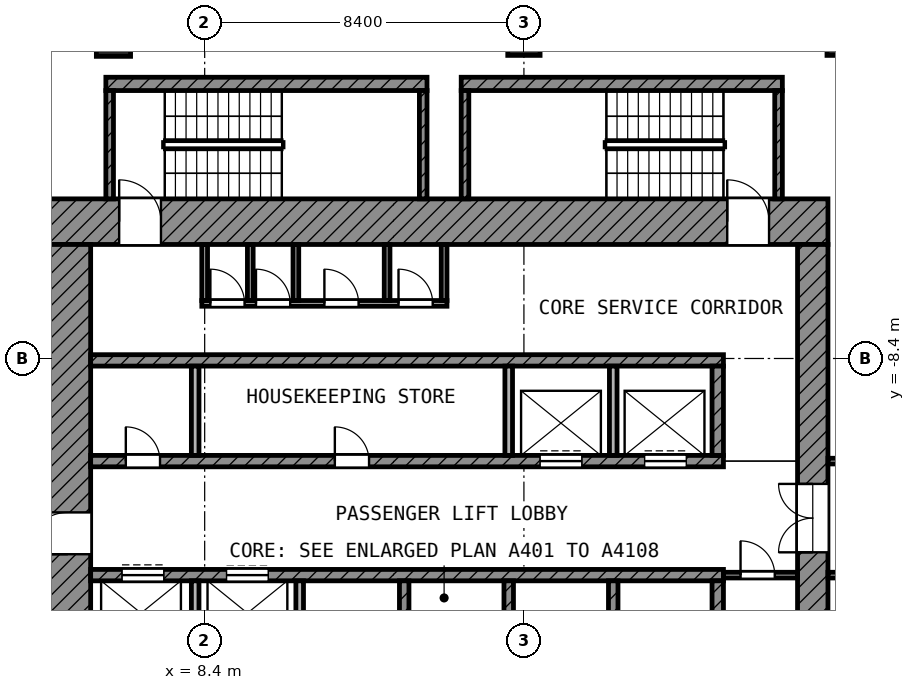
"""IFC4 building model, lengths in metres.
Left out: names, types, materials, properties, quantities, classifications, styles, units other than length and angle.
Written with IfcOpenShell. Run it as: python <this file> out.ifc"""

import sys

from ifc_helpers import new_model, si_unit, direction, frame, frame_2d, origin, origin_2d, place, context, subcontext, project, spatial, rectangle, extrude, element, fill, save


model = new_model("IFC4")
c1 = context("Model", 3, precision=1e-05, world=origin(), true_north=direction((0.0, 1.0)))
c2 = subcontext(c1, "Body", "Model", "MODEL_VIEW")
j1 = project(units=[si_unit("LENGTHUNIT", "METRE"), si_unit("PLANEANGLEUNIT", "RADIAN")], contexts=[c1])
p1 = place(None, origin())
s1 = spatial("IfcSite", under=j1, at=p1, CompositionType="ELEMENT")
p2 = place(p1, origin())
s2 = spatial("IfcBuilding", under=s1, at=p2, CompositionType="ELEMENT")
p3 = place(p2, frame((0.0, 0.0, 226.4)))
s3 = spatial("IfcBuildingStorey", under=s2, at=p3, CompositionType="ELEMENT", Elevation=226.4)
p4 = place(p3, frame((6.0, 0.0, 0.0), z_axis=(0.0, 0.0, 1.0), x_axis=(1.0, 0.0, 0.0)))
e1 = element("IfcColumn", 1, at=p4, inside=s3, PredefinedType="COLUMN", context=c2, shape_type="SweptSolid", body=[
    extrude(rectangle(XDim=0.9, YDim=0.9, at=origin_2d()), origin(), (0.0, 0.0, 1.0), 4.2),
])
for number, where, z_axis, x_axis in (
    (2, (16.8, 0.0, 0.0), (0.0, 0.0, 1.0), (1.0, 0.0, 0.0)),
    (3, (25.2, 0.0, 0.0), (0.0, 0.0, 1.0), (1.0, 0.0, 0.0)),
):
    element("IfcColumn", number, at=place(p3, frame(where, z_axis=z_axis, x_axis=x_axis)), inside=s3, PredefinedType="COLUMN", context=c2, shape_type="SweptSolid", body=[
        extrude(rectangle(XDim=0.85, YDim=0.85, at=origin_2d()), origin(), (0.0, 0.0, 1.0), 4.2),
    ])
p5 = place(p3, frame((4.2, -4.8, 0.0), z_axis=(0.0, 0.0, 1.0), x_axis=(1.0, 0.0, 0.0)))
e4 = element("IfcWall", 4, at=p5, inside=s3, PredefinedType="SHEAR", context=c2, shape_type="SweptSolid", body=[
    extrude(rectangle(XDim=20.6, YDim=1.2, at=frame_2d((10.3, 0.0))), origin(), (0.0, 0.0, 1.0), 3.6),
])
p6 = place(p5, frame((1.95, 0.0, 0.0)))
e5 = element("IfcOpeningElement", 5, at=p6, cuts=e4, PredefinedType="OPENING", context=c2, shape_type="SweptSolid", body=[
    extrude(rectangle(XDim=1.1, YDim=2.1, at=frame_2d((0.55, 1.05))), frame((0.0, 0.61, 0.0), z_axis=(0.0, -1.0, 0.0), x_axis=(1.0, 0.0, 0.0)), (0.0, 0.0, 1.0), 1.22),
])
p7 = place(p5, frame((17.95, 0.0, 0.0)))
e6 = element("IfcOpeningElement", 6, at=p7, cuts=e4, PredefinedType="OPENING", context=c2, shape_type="SweptSolid", body=[
    extrude(rectangle(XDim=1.1, YDim=2.1, at=frame_2d((0.55, 1.05))), frame((0.0, 0.61, 0.0), z_axis=(0.0, -1.0, 0.0), x_axis=(1.0, 0.0, 0.0)), (0.0, 0.0, 1.0), 1.22),
])
p8 = place(p3, frame((4.8, -24.8, 0.0), z_axis=(0.0, 0.0, 1.0), x_axis=(0.0, 1.0, 0.0)))
e7 = element("IfcWall", 7, at=p8, inside=s3, PredefinedType="SHEAR", context=c2, shape_type="SweptSolid", body=[
    extrude(rectangle(XDim=19.4, YDim=1.2, at=frame_2d((9.7, 0.0))), origin(), (0.0, 0.0, 1.0), 3.6),
])
p9 = place(p8, frame((11.25, 0.0, 0.0)))
e8 = element("IfcOpeningElement", 8, at=p9, cuts=e7, PredefinedType="OPENING", context=c2, shape_type="SweptSolid", body=[
    extrude(rectangle(XDim=1.1, YDim=2.1, at=frame_2d((0.55, 1.05))), frame((0.0, 0.61, 0.0), z_axis=(0.0, -1.0, 0.0), x_axis=(1.0, 0.0, 0.0)), (0.0, 0.0, 1.0), 1.22),
])
p10 = place(p8, frame((1.95, 0.0, 0.0)))
e9 = element("IfcOpeningElement", 9, at=p10, cuts=e7, PredefinedType="OPENING", context=c2, shape_type="SweptSolid", body=[
    extrude(rectangle(XDim=1.1, YDim=2.1, at=frame_2d((0.55, 1.05))), frame((0.0, 0.61, 0.0), z_axis=(0.0, -1.0, 0.0), x_axis=(1.0, 0.0, 0.0)), (0.0, 0.0, 1.0), 1.22),
])
p11 = place(p3, frame((24.4, -24.0, 0.0), z_axis=(0.0, 0.0, 1.0), x_axis=(0.0, 1.0, 0.0)))
e10 = element("IfcWall", 10, at=p11, inside=s3, PredefinedType="SHEAR", context=c2, shape_type="SweptSolid", body=[
    extrude(rectangle(XDim=18.6, YDim=0.8, at=frame_2d((9.3, 0.0))), origin(), (0.0, 0.0, 1.0), 3.6),
])
p12 = place(p11, frame((10.5, 0.0, 0.0)))
e11 = element("IfcOpeningElement", 11, at=p12, cuts=e10, PredefinedType="OPENING", context=c2, shape_type="SweptSolid", body=[
    extrude(rectangle(XDim=1.8, YDim=2.1, at=frame_2d((0.9, 1.05))), frame((0.0, 0.41, 0.0), z_axis=(0.0, -1.0, 0.0), x_axis=(1.0, 0.0, 0.0)), (0.0, 0.0, 1.0), 0.82),
])
p13 = place(p3, frame((5.4, -8.45, 0.0), z_axis=(0.0, 0.0, 1.0), x_axis=(1.0, 0.0, 0.0)))
e12 = element("IfcWall", 12, at=p13, inside=s3, PredefinedType="SHEAR", context=c2, shape_type="SweptSolid", body=[
    extrude(rectangle(XDim=16.65, YDim=0.3, at=frame_2d((8.325, 0.0))), origin(), (0.0, 0.0, 1.0), 3.6),
])
p14 = place(p3, frame((5.4, -11.1, 0.0), z_axis=(0.0, 0.0, 1.0), x_axis=(1.0, 0.0, 0.0)))
e13 = element("IfcWall", 13, at=p14, inside=s3, PredefinedType="SHEAR", context=c2, shape_type="SweptSolid", body=[
    extrude(rectangle(XDim=16.65, YDim=0.3, at=frame_2d((8.325, 0.0))), origin(), (0.0, 0.0, 1.0), 3.6),
])
p15 = place(p14, frame((11.825, 0.0, 0.0)))
e14 = element("IfcOpeningElement", 14, at=p15, cuts=e13, PredefinedType="OPENING", context=c2, shape_type="SweptSolid", body=[
    extrude(rectangle(XDim=1.1, YDim=2.1, at=frame_2d((0.55, 1.05))), frame((0.0, 0.16, 0.0), z_axis=(0.0, -1.0, 0.0), x_axis=(1.0, 0.0, 0.0)), (0.0, 0.0, 1.0), 0.32),
])
p16 = place(p14, frame((14.575, 0.0, 0.0)))
e15 = element("IfcOpeningElement", 15, at=p16, cuts=e13, PredefinedType="OPENING", context=c2, shape_type="SweptSolid", body=[
    extrude(rectangle(XDim=1.1, YDim=2.1, at=frame_2d((0.55, 1.05))), frame((0.0, 0.16, 0.0), z_axis=(0.0, -1.0, 0.0), x_axis=(1.0, 0.0, 0.0)), (0.0, 0.0, 1.0), 0.32),
])
p17 = place(p14, frame((0.925, 0.0, 0.0)))
e16 = element("IfcOpeningElement", 16, at=p17, cuts=e13, PredefinedType="OPENING", context=c2, shape_type="SweptSolid", body=[
    extrude(rectangle(XDim=0.9, YDim=2.1, at=frame_2d((0.45, 1.05))), frame((0.0, 0.16, 0.0), z_axis=(0.0, -1.0, 0.0), x_axis=(1.0, 0.0, 0.0)), (0.0, 0.0, 1.0), 0.32),
])
p18 = place(p14, frame((6.425, 0.0, 0.0)))
e17 = element("IfcOpeningElement", 17, at=p18, cuts=e13, PredefinedType="OPENING", context=c2, shape_type="SweptSolid", body=[
    extrude(rectangle(XDim=0.9, YDim=2.1, at=frame_2d((0.45, 1.05))), frame((0.0, 0.16, 0.0), z_axis=(0.0, -1.0, 0.0), x_axis=(1.0, 0.0, 0.0)), (0.0, 0.0, 1.0), 0.32),
])
p19 = place(p3, frame((5.4, -14.1, 0.0), z_axis=(0.0, 0.0, 1.0), x_axis=(1.0, 0.0, 0.0)))
e18 = element("IfcWall", 18, at=p19, inside=s3, PredefinedType="SHEAR", context=c2, shape_type="SweptSolid", body=[
    extrude(rectangle(XDim=16.65, YDim=0.3, at=frame_2d((8.325, 0.0))), origin(), (0.0, 0.0, 1.0), 3.6),
])
p20 = place(p19, frame((0.825, 0.0, 0.0)))
e19 = element("IfcOpeningElement", 19, at=p20, cuts=e18, PredefinedType="OPENING", context=c2, shape_type="SweptSolid", body=[
    extrude(rectangle(XDim=1.1, YDim=2.1, at=frame_2d((0.55, 1.05))), frame((0.0, 0.16, 0.0), z_axis=(0.0, -1.0, 0.0), x_axis=(1.0, 0.0, 0.0)), (0.0, 0.0, 1.0), 0.32),
])
p21 = place(p19, frame((3.575, 0.0, 0.0)))
e20 = element("IfcOpeningElement", 20, at=p21, cuts=e18, PredefinedType="OPENING", context=c2, shape_type="SweptSolid", body=[
    extrude(rectangle(XDim=1.1, YDim=2.1, at=frame_2d((0.55, 1.05))), frame((0.0, 0.16, 0.0), z_axis=(0.0, -1.0, 0.0), x_axis=(1.0, 0.0, 0.0)), (0.0, 0.0, 1.0), 0.32),
])
p22 = place(p3, frame((21.9, -10.95, 0.0), z_axis=(0.0, 0.0, 1.0), x_axis=(0.0, 1.0, 0.0)))
e21 = element("IfcWall", 21, at=p22, inside=s3, PredefinedType="SHEAR", context=c2, shape_type="SweptSolid", body=[
    extrude(rectangle(XDim=2.35, YDim=0.3, at=frame_2d((1.175, 0.0))), origin(), (0.0, 0.0, 1.0), 3.6),
])
p23 = place(p3, frame((21.9, -16.6, 0.0), z_axis=(0.0, 0.0, 1.0), x_axis=(0.0, 1.0, 0.0)))
e22 = element("IfcWall", 22, at=p23, inside=s3, PredefinedType="SHEAR", context=c2, shape_type="SweptSolid", body=[
    extrude(rectangle(XDim=2.35, YDim=0.3, at=frame_2d((1.175, 0.0))), origin(), (0.0, 0.0, 1.0), 3.6),
])
for number, where, z_axis, x_axis in (
    (23, (8.15, -10.95, 0.0), (0.0, 0.0, 1.0), (0.0, 1.0, 0.0)),
    (24, (16.4, -10.95, 0.0), (0.0, 0.0, 1.0), (0.0, 1.0, 0.0)),
    (25, (19.15, -10.95, 0.0), (0.0, 0.0, 1.0), (0.0, 1.0, 0.0)),
):
    element("IfcWall", number, at=place(p3, frame(where, z_axis=z_axis, x_axis=x_axis)), inside=s3, PredefinedType="PARTITIONING", context=c2, shape_type="SweptSolid", body=[
        extrude(rectangle(XDim=2.35, YDim=0.2, at=frame_2d((1.175, 0.0))), origin(), (0.0, 0.0, 1.0), 3.6),
    ])
for number, where, z_axis, x_axis in (
    (26, (8.15, -16.6, 0.0), (0.0, 0.0, 1.0), (0.0, 1.0, 0.0)),
    (27, (10.9, -16.6, 0.0), (0.0, 0.0, 1.0), (0.0, 1.0, 0.0)),
):
    element("IfcWall", number, at=place(p3, frame(where, z_axis=z_axis, x_axis=x_axis)), inside=s3, PredefinedType="PARTITIONING", context=c2, shape_type="SweptSolid", body=[
        extrude(rectangle(XDim=2.35, YDim=0.2, at=frame_2d((1.175, 0.0))), origin(), (0.0, 0.0, 1.0), 3.6),
    ])
for number, where, z_axis, x_axis in (
    (28, (13.65, -16.6, 0.0), (0.0, 0.0, 1.0), (0.0, 1.0, 0.0)),
    (29, (16.4, -16.6, 0.0), (0.0, 0.0, 1.0), (0.0, 1.0, 0.0)),
    (30, (19.15, -16.6, 0.0), (0.0, 0.0, 1.0), (0.0, 1.0, 0.0)),
):
    element("IfcWall", number, at=place(p3, frame(where, z_axis=z_axis, x_axis=x_axis)), inside=s3, PredefinedType="SHEAR", context=c2, shape_type="SweptSolid", body=[
        extrude(rectangle(XDim=2.35, YDim=0.25, at=frame_2d((1.175, 0.0))), origin(), (0.0, 0.0, 1.0), 3.6),
    ])
p24 = place(p3, frame((22.05, -14.1, 0.0), z_axis=(0.0, 0.0, 1.0), x_axis=(1.0, 0.0, 0.0)))
e31 = element("IfcWall", 31, at=p24, inside=s3, PredefinedType="PARTITIONING", context=c2, shape_type="SweptSolid", body=[
    extrude(rectangle(XDim=1.95, YDim=0.15, at=frame_2d((0.975, 0.0))), origin(), (0.0, 0.0, 1.0), 3.6),
])
p25 = place(p24, frame((0.45, 0.0, 0.0)))
e32 = element("IfcOpeningElement", 32, at=p25, cuts=e31, PredefinedType="OPENING", context=c2, shape_type="SweptSolid", body=[
    extrude(rectangle(XDim=0.9, YDim=2.1, at=frame_2d((0.45, 1.05))), frame((0.0, 0.085, 0.0), z_axis=(0.0, -1.0, 0.0), x_axis=(1.0, 0.0, 0.0)), (0.0, 0.0, 1.0), 0.17),
])
p26 = place(p3, frame((8.325, -6.95, 0.0), z_axis=(0.0, 0.0, 1.0), x_axis=(1.0, 0.0, 0.0)))
e33 = element("IfcWall", 33, at=p26, inside=s3, PredefinedType="PARTITIONING", context=c2, shape_type="SweptSolid", body=[
    extrude(rectangle(XDim=6.45, YDim=0.15, at=frame_2d((3.225, 0.0))), origin(), (0.0, 0.0, 1.0), 3.6),
])
p27 = place(p26, frame((0.225, 0.0, 0.0)))
e34 = element("IfcOpeningElement", 34, at=p27, cuts=e33, PredefinedType="OPENING", context=c2, shape_type="SweptSolid", body=[
    extrude(rectangle(XDim=0.9, YDim=2.1, at=frame_2d((0.45, 1.05))), frame((0.0, 0.085, 0.0), z_axis=(0.0, -1.0, 0.0), x_axis=(1.0, 0.0, 0.0)), (0.0, 0.0, 1.0), 0.17),
])
p28 = place(p26, frame((1.425, 0.0, 0.0)))
e35 = element("IfcOpeningElement", 35, at=p28, cuts=e33, PredefinedType="OPENING", context=c2, shape_type="SweptSolid", body=[
    extrude(rectangle(XDim=0.9, YDim=2.1, at=frame_2d((0.45, 1.05))), frame((0.0, 0.085, 0.0), z_axis=(0.0, -1.0, 0.0), x_axis=(1.0, 0.0, 0.0)), (0.0, 0.0, 1.0), 0.17),
])
p29 = place(p26, frame((3.225, 0.0, 0.0)))
e36 = element("IfcOpeningElement", 36, at=p29, cuts=e33, PredefinedType="OPENING", context=c2, shape_type="SweptSolid", body=[
    extrude(rectangle(XDim=0.9, YDim=2.1, at=frame_2d((0.45, 1.05))), frame((0.0, 0.085, 0.0), z_axis=(0.0, -1.0, 0.0), x_axis=(1.0, 0.0, 0.0)), (0.0, 0.0, 1.0), 0.17),
])
p30 = place(p26, frame((5.175, 0.0, 0.0)))
e37 = element("IfcOpeningElement", 37, at=p30, cuts=e33, PredefinedType="OPENING", context=c2, shape_type="SweptSolid", body=[
    extrude(rectangle(XDim=0.9, YDim=2.1, at=frame_2d((0.45, 1.05))), frame((0.0, 0.085, 0.0), z_axis=(0.0, -1.0, 0.0), x_axis=(1.0, 0.0, 0.0)), (0.0, 0.0, 1.0), 0.17),
])
for number, where, z_axis, x_axis in (
    (38, (8.4, -6.875, 0.0), (0.0, 0.0, 1.0), (0.0, 1.0, 0.0)),
    (39, (9.6, -6.875, 0.0), (0.0, 0.0, 1.0), (0.0, 1.0, 0.0)),
    (40, (10.8, -6.875, 0.0), (0.0, 0.0, 1.0), (0.0, 1.0, 0.0)),
    (41, (13.2, -6.875, 0.0), (0.0, 0.0, 1.0), (0.0, 1.0, 0.0)),
    (42, (14.7, -6.875, 0.0), (0.0, 0.0, 1.0), (0.0, 1.0, 0.0)),
):
    element("IfcWall", number, at=place(p3, frame(where, z_axis=z_axis, x_axis=x_axis)), inside=s3, PredefinedType="PARTITIONING", context=c2, shape_type="SweptSolid", body=[
        extrude(rectangle(XDim=1.475, YDim=0.15, at=frame_2d((0.738, 0.0))), origin(), (0.0, 0.0, 1.0), 3.6),
    ])
p31 = place(p3, frame((5.8, -1.175, 0.0), z_axis=(0.0, 0.0, 1.0), x_axis=(1.0, 0.0, 0.0)))
e43 = element("IfcWall", 43, at=p31, inside=s3, PredefinedType="SHEAR", context=c2, shape_type="SweptSolid", body=[
    extrude(rectangle(XDim=8.45, YDim=0.35, at=frame_2d((4.225, 0.0))), origin(), (0.0, 0.0, 1.0), 3.6),
])
for number, where, z_axis, x_axis in (
    (44, (5.9, -4.2, 0.0), (0.0, 0.0, 1.0), (0.0, 1.0, 0.0)),
    (45, (14.15, -4.2, 0.0), (0.0, 0.0, 1.0), (0.0, 1.0, 0.0)),
):
    element("IfcWall", number, at=place(p3, frame(where, z_axis=z_axis, x_axis=x_axis)), inside=s3, PredefinedType="SHEAR", context=c2, shape_type="SweptSolid", body=[
        extrude(rectangle(XDim=2.85, YDim=0.2, at=frame_2d((1.425, 0.0))), origin(), (0.0, 0.0, 1.0), 3.6),
    ])
p32 = place(p3, frame((15.15, -1.175, 0.0), z_axis=(0.0, 0.0, 1.0), x_axis=(1.0, 0.0, 0.0)))
e46 = element("IfcWall", 46, at=p32, inside=s3, PredefinedType="SHEAR", context=c2, shape_type="SweptSolid", body=[
    extrude(rectangle(XDim=8.45, YDim=0.35, at=frame_2d((4.225, 0.0))), origin(), (0.0, 0.0, 1.0), 3.6),
])
for number, where, z_axis, x_axis in (
    (47, (15.25, -4.2, 0.0), (0.0, 0.0, 1.0), (0.0, 1.0, 0.0)),
    (48, (23.5, -4.2, 0.0), (0.0, 0.0, 1.0), (0.0, 1.0, 0.0)),
):
    element("IfcWall", number, at=place(p3, frame(where, z_axis=z_axis, x_axis=x_axis)), inside=s3, PredefinedType="SHEAR", context=c2, shape_type="SweptSolid", body=[
        extrude(rectangle(XDim=2.85, YDim=0.2, at=frame_2d((1.425, 0.0))), origin(), (0.0, 0.0, 1.0), 3.6),
    ])
p33 = place(p3, frame((24.8, -14.1, 0.0), z_axis=(0.0, 0.0, 1.0), x_axis=(1.0, 0.0, 0.0)))
e49 = element("IfcWall", 49, at=p33, inside=s3, PredefinedType="PARTITIONING", context=c2, shape_type="SweptSolid", body=[
    extrude(rectangle(XDim=4.525, YDim=0.15, at=frame_2d((2.262, 0.0))), origin(), (0.0, 0.0, 1.0), 3.6),
])
p34 = place(p33, frame((2.7, 0.0, 0.0)))
e50 = element("IfcOpeningElement", 50, at=p34, cuts=e49, PredefinedType="OPENING", context=c2, shape_type="SweptSolid", body=[
    extrude(rectangle(XDim=1.0, YDim=2.1, at=frame_2d((0.5, 1.05))), frame((0.0, 0.085, 0.0), z_axis=(0.0, -1.0, 0.0), x_axis=(1.0, 0.0, 0.0)), (0.0, 0.0, 1.0), 0.17),
])
p35 = place(p33, frame((1.3, 0.0, 0.0)))
e51 = element("IfcOpeningElement", 51, at=p35, cuts=e49, PredefinedType="OPENING", context=c2, shape_type="SweptSolid", body=[
    extrude(rectangle(XDim=1.0, YDim=2.1, at=frame_2d((0.5, 1.05))), frame((0.0, 0.085, 0.0), z_axis=(0.0, -1.0, 0.0), x_axis=(1.0, 0.0, 0.0)), (0.0, 0.0, 1.0), 0.17),
])
p36 = place(p3, frame((24.8, -11.1, 0.0), z_axis=(0.0, 0.0, 1.0), x_axis=(1.0, 0.0, 0.0)))
e52 = element("IfcWall", 52, at=p36, inside=s3, PredefinedType="PARTITIONING", context=c2, shape_type="SweptSolid", body=[
    extrude(rectangle(XDim=4.6, YDim=0.15, at=frame_2d((2.3, 0.0))), origin(), (0.0, 0.0, 1.0), 3.6),
])
p37 = place(p36, frame((1.9, 0.0, 0.0)))
e53 = element("IfcOpeningElement", 53, at=p37, cuts=e52, PredefinedType="OPENING", context=c2, shape_type="SweptSolid", body=[
    extrude(rectangle(XDim=1.2, YDim=2.1, at=frame_2d((0.6, 1.05))), frame((0.0, 0.085, 0.0), z_axis=(0.0, -1.0, 0.0), x_axis=(1.0, 0.0, 0.0)), (0.0, 0.0, 1.0), 0.17),
])
p38 = place(p15, origin())
e54 = element("IfcDoor", 54, at=p38, inside=s3, OperationType="DOUBLE_DOOR_SLIDING", PredefinedType="DOOR", context=c2, shape_type="SweptSolid", body=[
    extrude(rectangle(XDim=1.1, YDim=2.1, at=frame_2d((0.55, 1.05))), frame((0.0, 0.025, 0.0), z_axis=(0.0, -1.0, 0.0), x_axis=(1.0, 0.0, 0.0)), (0.0, 0.0, 1.0), 0.05),
])
fill(e14, e54)
p39 = place(p16, origin())
e55 = element("IfcDoor", 55, at=p39, inside=s3, OperationType="DOUBLE_DOOR_SLIDING", PredefinedType="DOOR", context=c2, shape_type="SweptSolid", body=[
    extrude(rectangle(XDim=1.1, YDim=2.1, at=frame_2d((0.55, 1.05))), frame((0.0, 0.025, 0.0), z_axis=(0.0, -1.0, 0.0), x_axis=(1.0, 0.0, 0.0)), (0.0, 0.0, 1.0), 0.05),
])
fill(e15, e55)
p40 = place(p20, origin())
e56 = element("IfcDoor", 56, at=p40, inside=s3, OperationType="DOUBLE_DOOR_SLIDING", PredefinedType="DOOR", context=c2, shape_type="SweptSolid", body=[
    extrude(rectangle(XDim=1.1, YDim=2.1, at=frame_2d((0.55, 1.05))), frame((0.0, 0.025, 0.0), z_axis=(0.0, -1.0, 0.0), x_axis=(1.0, 0.0, 0.0)), (0.0, 0.0, 1.0), 0.05),
])
fill(e19, e56)
p41 = place(p21, origin())
e57 = element("IfcDoor", 57, at=p41, inside=s3, OperationType="DOUBLE_DOOR_SLIDING", PredefinedType="DOOR", context=c2, shape_type="SweptSolid", body=[
    extrude(rectangle(XDim=1.1, YDim=2.1, at=frame_2d((0.55, 1.05))), frame((0.0, 0.025, 0.0), z_axis=(0.0, -1.0, 0.0), x_axis=(1.0, 0.0, 0.0)), (0.0, 0.0, 1.0), 0.05),
])
fill(e20, e57)
p42 = place(p9, origin())
e58 = element("IfcDoor", 58, at=p42, inside=s3, OperationType="SINGLE_SWING_LEFT", PredefinedType="DOOR", context=c2, shape_type="SweptSolid", body=[
    extrude(rectangle(XDim=1.1, YDim=2.1, at=frame_2d((0.55, 1.05))), frame((0.0, 0.025, 0.0), z_axis=(0.0, -1.0, 0.0), x_axis=(1.0, 0.0, 0.0)), (0.0, 0.0, 1.0), 0.05),
])
fill(e8, e58)
p43 = place(p6, origin())
e59 = element("IfcDoor", 59, at=p43, inside=s3, OperationType="SINGLE_SWING_LEFT", PredefinedType="DOOR", context=c2, shape_type="SweptSolid", body=[
    extrude(rectangle(XDim=1.1, YDim=2.1, at=frame_2d((0.55, 1.05))), frame((0.0, 0.025, 0.0), z_axis=(0.0, -1.0, 0.0), x_axis=(1.0, 0.0, 0.0)), (0.0, 0.0, 1.0), 0.05),
])
fill(e5, e59)
p44 = place(p7, origin())
e60 = element("IfcDoor", 60, at=p44, inside=s3, OperationType="SINGLE_SWING_LEFT", PredefinedType="DOOR", context=c2, shape_type="SweptSolid", body=[
    extrude(rectangle(XDim=1.1, YDim=2.1, at=frame_2d((0.55, 1.05))), frame((0.0, 0.025, 0.0), z_axis=(0.0, -1.0, 0.0), x_axis=(1.0, 0.0, 0.0)), (0.0, 0.0, 1.0), 0.05),
])
fill(e6, e60)
p45 = place(p12, origin())
e61 = element("IfcDoor", 61, at=p45, inside=s3, OperationType="DOUBLE_DOOR_SINGLE_SWING", PredefinedType="DOOR", context=c2, shape_type="SweptSolid", body=[
    extrude(rectangle(XDim=1.8, YDim=2.1, at=frame_2d((0.9, 1.05))), frame((0.0, 0.025, 0.0), z_axis=(0.0, -1.0, 0.0), x_axis=(1.0, 0.0, 0.0)), (0.0, 0.0, 1.0), 0.05),
])
fill(e11, e61)
p46 = place(p27, origin())
e62 = element("IfcDoor", 62, at=p46, inside=s3, OperationType="SINGLE_SWING_LEFT", PredefinedType="DOOR", context=c2, shape_type="SweptSolid", body=[
    extrude(rectangle(XDim=0.9, YDim=2.1, at=frame_2d((0.45, 1.05))), frame((0.0, 0.025, 0.0), z_axis=(0.0, -1.0, 0.0), x_axis=(1.0, 0.0, 0.0)), (0.0, 0.0, 1.0), 0.05),
])
fill(e34, e62)
p47 = place(p28, origin())
e63 = element("IfcDoor", 63, at=p47, inside=s3, OperationType="SINGLE_SWING_LEFT", PredefinedType="DOOR", context=c2, shape_type="SweptSolid", body=[
    extrude(rectangle(XDim=0.9, YDim=2.1, at=frame_2d((0.45, 1.05))), frame((0.0, 0.025, 0.0), z_axis=(0.0, -1.0, 0.0), x_axis=(1.0, 0.0, 0.0)), (0.0, 0.0, 1.0), 0.05),
])
fill(e35, e63)
p48 = place(p29, origin())
e64 = element("IfcDoor", 64, at=p48, inside=s3, OperationType="SINGLE_SWING_LEFT", PredefinedType="DOOR", context=c2, shape_type="SweptSolid", body=[
    extrude(rectangle(XDim=0.9, YDim=2.1, at=frame_2d((0.45, 1.05))), frame((0.0, 0.025, 0.0), z_axis=(0.0, -1.0, 0.0), x_axis=(1.0, 0.0, 0.0)), (0.0, 0.0, 1.0), 0.05),
])
fill(e36, e64)
p49 = place(p30, origin())
e65 = element("IfcDoor", 65, at=p49, inside=s3, OperationType="SINGLE_SWING_LEFT", PredefinedType="DOOR", context=c2, shape_type="SweptSolid", body=[
    extrude(rectangle(XDim=0.9, YDim=2.1, at=frame_2d((0.45, 1.05))), frame((0.0, 0.025, 0.0), z_axis=(0.0, -1.0, 0.0), x_axis=(1.0, 0.0, 0.0)), (0.0, 0.0, 1.0), 0.05),
])
fill(e37, e65)
p50 = place(p25, origin())
e66 = element("IfcDoor", 66, at=p50, inside=s3, OperationType="SINGLE_SWING_LEFT", PredefinedType="DOOR", context=c2, shape_type="SweptSolid", body=[
    extrude(rectangle(XDim=0.9, YDim=2.1, at=frame_2d((0.45, 1.05))), frame((0.0, 0.025, 0.0), z_axis=(0.0, -1.0, 0.0), x_axis=(1.0, 0.0, 0.0)), (0.0, 0.0, 1.0), 0.05),
])
fill(e32, e66)
p51 = place(p17, origin())
e67 = element("IfcDoor", 67, at=p51, inside=s3, OperationType="SINGLE_SWING_LEFT", PredefinedType="DOOR", context=c2, shape_type="SweptSolid", body=[
    extrude(rectangle(XDim=0.9, YDim=2.1, at=frame_2d((0.45, 1.05))), frame((0.0, 0.025, 0.0), z_axis=(0.0, -1.0, 0.0), x_axis=(1.0, 0.0, 0.0)), (0.0, 0.0, 1.0), 0.05),
])
fill(e16, e67)
p52 = place(p18, origin())
e68 = element("IfcDoor", 68, at=p52, inside=s3, OperationType="SINGLE_SWING_LEFT", PredefinedType="DOOR", context=c2, shape_type="SweptSolid", body=[
    extrude(rectangle(XDim=0.9, YDim=2.1, at=frame_2d((0.45, 1.05))), frame((0.0, 0.025, 0.0), z_axis=(0.0, -1.0, 0.0), x_axis=(1.0, 0.0, 0.0)), (0.0, 0.0, 1.0), 0.05),
])
fill(e17, e68)
save(model, sys.argv[1])
